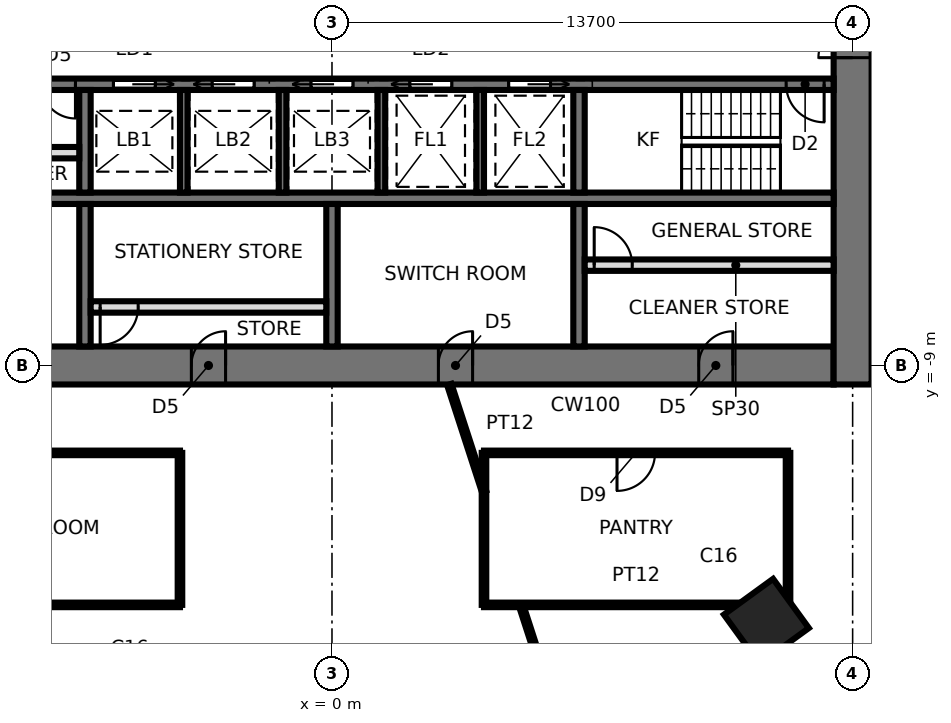
"""IFC4 building model, lengths in metres.
Left out: names, types, materials, properties, quantities, classifications, styles, units other than length and angle.
Written with IfcOpenShell. Run it as: python <this file> out.ifc"""

import sys

from ifc_helpers import new_model, si_unit, direction, frame, frame_2d, origin, origin_2d, place, context, subcontext, project, spatial, rectangle, extrude, element, fill, save


model = new_model("IFC4")
c1 = context("Model", 3, precision=1e-05, world=origin(), true_north=direction((0.0, 1.0)))
c2 = subcontext(c1, "Body", "Model", "MODEL_VIEW")
j1 = project(units=[si_unit("LENGTHUNIT", "METRE"), si_unit("PLANEANGLEUNIT", "RADIAN")], contexts=[c1])
p1 = place(None, origin())
s1 = spatial("IfcSite", under=j1, at=p1, CompositionType="ELEMENT")
p2 = place(p1, origin())
s2 = spatial("IfcBuilding", under=s1, at=p2, CompositionType="ELEMENT")
p3 = place(p2, frame((0.0, 0.0, 162.6)))
s3 = spatial("IfcBuildingStorey", under=s2, at=p3, CompositionType="ELEMENT", Elevation=162.6)
p4 = place(p3, frame((11.43, -15.733, 0.0), z_axis=(0.0, 0.0, 1.0), x_axis=(0.587785252292, -0.809016994375, 0.0)))
e1 = element("IfcColumn", 1, at=p4, inside=s3, PredefinedType="COLUMN", context=c2, shape_type="SweptSolid", body=[
    extrude(rectangle(XDim=1.6, YDim=1.6, at=origin_2d()), origin(), (0.0, 0.0, 1.0), 3.9),
])
p5 = place(p3, frame((-13.2, -9.0, 0.0), z_axis=(0.0, 0.0, 1.0), x_axis=(1.0, 0.0, 0.0)))
e2 = element("IfcWall", 2, at=p5, inside=s3, PredefinedType="SHEAR", context=c2, shape_type="SweptSolid", body=[
    extrude(rectangle(XDim=26.4, YDim=1.0, at=frame_2d((13.2, 0.0))), origin(), (0.0, 0.0, 1.0), 3.9),
])
p6 = place(p5, frame((2.65, 0.0, 0.0)))
e3 = element("IfcOpeningElement", 3, at=p6, cuts=e2, PredefinedType="OPENING", context=c2, shape_type="SweptSolid", body=[
    extrude(rectangle(XDim=0.9, YDim=2.1, at=frame_2d((0.45, 1.05))), frame((0.0, 0.51, 0.0), z_axis=(0.0, -1.0, 0.0), x_axis=(1.0, 0.0, 0.0)), (0.0, 0.0, 1.0), 1.02),
])
p7 = place(p5, frame((9.5, 0.0, 0.0)))
e4 = element("IfcOpeningElement", 4, at=p7, cuts=e2, PredefinedType="OPENING", context=c2, shape_type="SweptSolid", body=[
    extrude(rectangle(XDim=0.9, YDim=2.1, at=frame_2d((0.45, 1.05))), frame((0.0, 0.51, 0.0), z_axis=(0.0, -1.0, 0.0), x_axis=(1.0, 0.0, 0.0)), (0.0, 0.0, 1.0), 1.02),
])
p8 = place(p5, frame((16.0, 0.0, 0.0)))
e5 = element("IfcOpeningElement", 5, at=p8, cuts=e2, PredefinedType="OPENING", context=c2, shape_type="SweptSolid", body=[
    extrude(rectangle(XDim=0.9, YDim=2.1, at=frame_2d((0.45, 1.05))), frame((0.0, 0.51, 0.0), z_axis=(0.0, -1.0, 0.0), x_axis=(1.0, 0.0, 0.0)), (0.0, 0.0, 1.0), 1.02),
])
p9 = place(p5, frame((22.85, 0.0, 0.0)))
e6 = element("IfcOpeningElement", 6, at=p9, cuts=e2, PredefinedType="OPENING", context=c2, shape_type="SweptSolid", body=[
    extrude(rectangle(XDim=0.9, YDim=2.1, at=frame_2d((0.45, 1.05))), frame((0.0, 0.51, 0.0), z_axis=(0.0, -1.0, 0.0), x_axis=(1.0, 0.0, 0.0)), (0.0, 0.0, 1.0), 1.02),
])
p10 = place(p3, frame((13.7, -9.5, 0.0), z_axis=(0.0, 0.0, 1.0), x_axis=(0.0, 1.0, 0.0)))
e7 = element("IfcWall", 7, at=p10, inside=s3, PredefinedType="SHEAR", context=c2, shape_type="SweptSolid", body=[
    extrude(rectangle(XDim=19.0, YDim=1.0, at=frame_2d((9.5, 0.0))), origin(), (0.0, 0.0, 1.0), 3.9),
])
p11 = place(p10, frame((8.6, 0.0, 0.0)))
e8 = element("IfcOpeningElement", 8, at=p11, cuts=e7, PredefinedType="OPENING", context=c2, shape_type="SweptSolid", body=[
    extrude(rectangle(XDim=1.8, YDim=2.4, at=frame_2d((0.9, 1.2))), frame((0.0, 0.51, 0.0), z_axis=(0.0, -1.0, 0.0), x_axis=(1.0, 0.0, 0.0)), (0.0, 0.0, 1.0), 1.02),
])
p12 = place(p3, frame((-13.2, -1.6, 0.0), z_axis=(0.0, 0.0, 1.0), x_axis=(1.0, 0.0, 0.0)))
e9 = element("IfcWall", 9, at=p12, inside=s3, PredefinedType="SHEAR", context=c2, shape_type="SweptSolid", body=[
    extrude(rectangle(XDim=26.4, YDim=0.3, at=frame_2d((13.2, 0.0))), origin(), (0.0, 0.0, 1.0), 3.9),
])
p13 = place(p12, frame((25.15, 0.0, 0.0)))
e10 = element("IfcOpeningElement", 10, at=p13, cuts=e9, PredefinedType="OPENING", context=c2, shape_type="SweptSolid", body=[
    extrude(rectangle(XDim=1.0, YDim=2.1, at=frame_2d((0.5, 1.05))), frame((0.0, 0.16, 0.0), z_axis=(0.0, -1.0, 0.0), x_axis=(1.0, 0.0, 0.0)), (0.0, 0.0, 1.0), 0.32),
])
p14 = place(p12, frame((7.45, 0.0, 0.0)))
e11 = element("IfcOpeningElement", 11, at=p14, cuts=e9, PredefinedType="OPENING", context=c2, shape_type="SweptSolid", body=[
    extrude(rectangle(XDim=1.1, YDim=2.3, at=frame_2d((0.55, 1.15))), frame((0.0, 0.16, 0.0), z_axis=(0.0, -1.0, 0.0), x_axis=(1.0, 0.0, 0.0)), (0.0, 0.0, 1.0), 0.32),
])
p15 = place(p12, frame((10.05, 0.0, 0.0)))
e12 = element("IfcOpeningElement", 12, at=p15, cuts=e9, PredefinedType="OPENING", context=c2, shape_type="SweptSolid", body=[
    extrude(rectangle(XDim=1.1, YDim=2.3, at=frame_2d((0.55, 1.15))), frame((0.0, 0.16, 0.0), z_axis=(0.0, -1.0, 0.0), x_axis=(1.0, 0.0, 0.0)), (0.0, 0.0, 1.0), 0.32),
])
p16 = place(p12, frame((12.65, 0.0, 0.0)))
e13 = element("IfcOpeningElement", 13, at=p16, cuts=e9, PredefinedType="OPENING", context=c2, shape_type="SweptSolid", body=[
    extrude(rectangle(XDim=1.1, YDim=2.3, at=frame_2d((0.55, 1.15))), frame((0.0, 0.16, 0.0), z_axis=(0.0, -1.0, 0.0), x_axis=(1.0, 0.0, 0.0)), (0.0, 0.0, 1.0), 0.32),
])
p17 = place(p12, frame((15.25, 0.0, 0.0)))
e14 = element("IfcOpeningElement", 14, at=p17, cuts=e9, PredefinedType="OPENING", context=c2, shape_type="SweptSolid", body=[
    extrude(rectangle(XDim=1.1, YDim=2.3, at=frame_2d((0.55, 1.15))), frame((0.0, 0.16, 0.0), z_axis=(0.0, -1.0, 0.0), x_axis=(1.0, 0.0, 0.0)), (0.0, 0.0, 1.0), 0.32),
])
p18 = place(p12, frame((17.85, 0.0, 0.0)))
e15 = element("IfcOpeningElement", 15, at=p18, cuts=e9, PredefinedType="OPENING", context=c2, shape_type="SweptSolid", body=[
    extrude(rectangle(XDim=1.1, YDim=2.3, at=frame_2d((0.55, 1.15))), frame((0.0, 0.16, 0.0), z_axis=(0.0, -1.0, 0.0), x_axis=(1.0, 0.0, 0.0)), (0.0, 0.0, 1.0), 0.32),
])
p19 = place(p12, frame((5.55, 0.0, 0.0)))
e16 = element("IfcOpeningElement", 16, at=p19, cuts=e9, PredefinedType="OPENING", context=c2, shape_type="SweptSolid", body=[
    extrude(rectangle(XDim=0.9, YDim=2.1, at=frame_2d((0.45, 1.05))), frame((0.0, 0.16, 0.0), z_axis=(0.0, -1.0, 0.0), x_axis=(1.0, 0.0, 0.0)), (0.0, 0.0, 1.0), 0.32),
])
p20 = place(p3, frame((-13.2, -4.6, 0.0), z_axis=(0.0, 0.0, 1.0), x_axis=(1.0, 0.0, 0.0)))
e17 = element("IfcWall", 17, at=p20, inside=s3, PredefinedType="SHEAR", context=c2, shape_type="SweptSolid", body=[
    extrude(rectangle(XDim=26.4, YDim=0.3, at=frame_2d((13.2, 0.0))), origin(), (0.0, 0.0, 1.0), 3.9),
])
p21 = place(p3, frame((-6.5, -1.75, 0.0), z_axis=(0.0, 0.0, 1.0), x_axis=(0.0, -1.0, 0.0)))
e18 = element("IfcWall", 18, at=p21, inside=s3, PredefinedType="SHEAR", context=c2, shape_type="SweptSolid", body=[
    extrude(rectangle(XDim=2.7, YDim=0.3, at=frame_2d((1.35, 0.0))), origin(), (0.0, 0.0, 1.0), 3.9),
])
p22 = place(p3, frame((-6.5, -4.75, 0.0), z_axis=(0.0, 0.0, 1.0), x_axis=(0.0, -1.0, 0.0)))
e19 = element("IfcWall", 19, at=p22, inside=s3, PredefinedType="SHEAR", context=c2, shape_type="SweptSolid", body=[
    extrude(rectangle(XDim=3.75, YDim=0.3, at=frame_2d((1.875, 0.0))), origin(), (0.0, 0.0, 1.0), 3.9),
])
p23 = place(p3, frame((6.5, -1.75, 0.0), z_axis=(0.0, 0.0, 1.0), x_axis=(0.0, -1.0, 0.0)))
e20 = element("IfcWall", 20, at=p23, inside=s3, PredefinedType="SHEAR", context=c2, shape_type="SweptSolid", body=[
    extrude(rectangle(XDim=2.7, YDim=0.3, at=frame_2d((1.35, 0.0))), origin(), (0.0, 0.0, 1.0), 3.9),
])
p24 = place(p3, frame((6.5, -4.75, 0.0), z_axis=(0.0, 0.0, 1.0), x_axis=(0.0, -1.0, 0.0)))
e21 = element("IfcWall", 21, at=p24, inside=s3, PredefinedType="SHEAR", context=c2, shape_type="SweptSolid", body=[
    extrude(rectangle(XDim=3.75, YDim=0.3, at=frame_2d((1.875, 0.0))), origin(), (0.0, 0.0, 1.0), 3.9),
])
for number, where, z_axis, x_axis in (
    (22, (-3.9, -1.75, 0.0), (0.0, 0.0, 1.0), (0.0, -1.0, 0.0)),
    (23, (-1.3, -1.75, 0.0), (0.0, 0.0, 1.0), (0.0, -1.0, 0.0)),
    (24, (1.3, -1.75, 0.0), (0.0, 0.0, 1.0), (0.0, -1.0, 0.0)),
    (25, (3.9, -1.75, 0.0), (0.0, 0.0, 1.0), (0.0, -1.0, 0.0)),
):
    element("IfcWall", number, at=place(p3, frame(where, z_axis=z_axis, x_axis=x_axis)), inside=s3, PredefinedType="SHEAR", context=c2, shape_type="SweptSolid", body=[
        extrude(rectangle(XDim=2.7, YDim=0.2, at=frame_2d((1.35, 0.0))), origin(), (0.0, 0.0, 1.0), 3.9),
    ])
p25 = place(p3, frame((0.0, -4.75, 0.0), z_axis=(0.0, 0.0, 1.0), x_axis=(0.0, -1.0, 0.0)))
e26 = element("IfcWall", 26, at=p25, inside=s3, PredefinedType="SHEAR", context=c2, shape_type="SweptSolid", body=[
    extrude(rectangle(XDim=3.75, YDim=0.3, at=frame_2d((1.875, 0.0))), origin(), (0.0, 0.0, 1.0), 3.9),
])
p26 = place(p3, frame((-6.35, -7.46, 0.0), z_axis=(0.0, 0.0, 1.0), x_axis=(1.0, 0.0, 0.0)))
e27 = element("IfcWall", 27, at=p26, inside=s3, PredefinedType="PARTITIONING", context=c2, shape_type="SweptSolid", body=[
    extrude(rectangle(XDim=6.2, YDim=0.3, at=frame_2d((3.1, 0.0))), origin(), (0.0, 0.0, 1.0), 3.7),
])
p27 = place(p26, frame((0.25, 0.0, 0.0)))
e28 = element("IfcOpeningElement", 28, at=p27, cuts=e27, PredefinedType="OPENING", context=c2, shape_type="SweptSolid", body=[
    extrude(rectangle(XDim=1.0, YDim=2.4, at=frame_2d((0.5, 1.2))), frame((0.0, 0.16, 0.0), z_axis=(0.0, -1.0, 0.0), x_axis=(1.0, 0.0, 0.0)), (0.0, 0.0, 1.0), 0.32),
])
p28 = place(p3, frame((6.65, -6.36, 0.0), z_axis=(0.0, 0.0, 1.0), x_axis=(1.0, 0.0, 0.0)))
e29 = element("IfcWall", 29, at=p28, inside=s3, PredefinedType="PARTITIONING", context=c2, shape_type="SweptSolid", body=[
    extrude(rectangle(XDim=6.55, YDim=0.3, at=frame_2d((3.275, 0.0))), origin(), (0.0, 0.0, 1.0), 3.7),
])
p29 = place(p28, frame((0.25, 0.0, 0.0)))
e30 = element("IfcOpeningElement", 30, at=p29, cuts=e29, PredefinedType="OPENING", context=c2, shape_type="SweptSolid", body=[
    extrude(rectangle(XDim=1.0, YDim=2.4, at=frame_2d((0.5, 1.2))), frame((0.0, 0.16, 0.0), z_axis=(0.0, -1.0, 0.0), x_axis=(1.0, 0.0, 0.0)), (0.0, 0.0, 1.0), 0.32),
])
p30 = place(p3, frame((-13.2, -3.4, 0.0), z_axis=(0.0, 0.0, 1.0), x_axis=(1.0, 0.0, 0.0)))
e31 = element("IfcWall", 31, at=p30, inside=s3, PredefinedType="SOLIDWALL", context=c2, shape_type="SweptSolid", body=[
    extrude(rectangle(XDim=6.55, YDim=0.3, at=frame_2d((3.275, 0.0))), origin(), (0.0, 0.0, 1.0), 3.7),
])
p31 = place(p30, frame((0.25, 0.0, 0.0)))
e32 = element("IfcOpeningElement", 32, at=p31, cuts=e31, PredefinedType="OPENING", context=c2, shape_type="SweptSolid", body=[
    extrude(rectangle(XDim=0.9, YDim=2.1, at=frame_2d((0.45, 1.05))), frame((0.0, 0.16, 0.0), z_axis=(0.0, -1.0, 0.0), x_axis=(1.0, 0.0, 0.0)), (0.0, 0.0, 1.0), 0.32),
])
p32 = place(p3, frame((-12.0, -11.3, 0.0), z_axis=(0.0, 0.0, 1.0), x_axis=(1.0, 0.0, 0.0)))
e33 = element("IfcWall", 33, at=p32, inside=s3, PredefinedType="PARTITIONING", context=c2, shape_type="SweptSolid", body=[
    extrude(rectangle(XDim=8.0, YDim=0.12, at=frame_2d((4.0, 0.0))), origin(), (0.0, 0.0, 1.0), 3.7),
])
p33 = place(p32, frame((3.5, 0.0, 0.0)))
e34 = element("IfcOpeningElement", 34, at=p33, cuts=e33, PredefinedType="OPENING", context=c2, shape_type="SweptSolid", body=[
    extrude(rectangle(XDim=1.0, YDim=2.4, at=frame_2d((0.5, 1.2))), frame((0.0, 0.07, 0.0), z_axis=(0.0, -1.0, 0.0), x_axis=(1.0, 0.0, 0.0)), (0.0, 0.0, 1.0), 0.14),
])
p34 = place(p3, frame((-4.0, -15.3, 0.0), z_axis=(0.0, 0.0, 1.0), x_axis=(-1.0, 0.0, 0.0)))
e35 = element("IfcWall", 35, at=p34, inside=s3, PredefinedType="PARTITIONING", context=c2, shape_type="SweptSolid", body=[
    extrude(rectangle(XDim=8.0, YDim=0.12, at=frame_2d((4.0, 0.0))), origin(), (0.0, 0.0, 1.0), 3.24),
])
for number, where, z_axis, x_axis in (
    (36, (-4.0, -11.3, 0.0), (0.0, 0.0, 1.0), (0.0, -1.0, 0.0)),
    (37, (4.0, -11.3, 0.0), (0.0, 0.0, 1.0), (0.0, -1.0, 0.0)),
):
    element("IfcWall", number, at=place(p3, frame(where, z_axis=z_axis, x_axis=x_axis)), inside=s3, PredefinedType="PARTITIONING", context=c2, shape_type="SweptSolid", body=[
        extrude(rectangle(XDim=4.0, YDim=0.12, at=frame_2d((2.0, 0.0))), origin(), (0.0, 0.0, 1.0), 3.7),
    ])
p35 = place(p3, frame((3.087, -9.5, 0.0), z_axis=(0.0, 0.0, 1.0), x_axis=(0.309031903466, -0.951051671908, 0.0)))
e38 = element("IfcWall", 38, at=p35, inside=s3, PredefinedType="PARTITIONING", context=c2, shape_type="SweptSolid", body=[
    extrude(rectangle(XDim=2.956, YDim=0.12, at=frame_2d((1.478, 0.0))), origin(), (0.0, 0.0, 1.0), 2.7),
])
p36 = place(p3, frame((4.971, -15.3, 0.0), z_axis=(0.0, 0.0, 1.0), x_axis=(0.309041065628, -0.951048694734, 0.0)))
e39 = element("IfcWall", 39, at=p36, inside=s3, PredefinedType="PARTITIONING", context=c2, shape_type="SweptSolid", body=[
    extrude(rectangle(XDim=6.01, YDim=0.12, at=frame_2d((3.005, 0.0))), origin(), (0.0, 0.0, 1.0), 2.7),
])
p37 = place(p3, frame((4.0, -15.3, 0.0), z_axis=(0.0, 0.0, 1.0), x_axis=(1.0, 0.0, 0.0)))
e40 = element("IfcWall", 40, at=p37, inside=s3, PredefinedType="PARTITIONING", context=c2, shape_type="SweptSolid", body=[
    extrude(rectangle(XDim=8.0, YDim=0.12, at=frame_2d((4.0, 0.0))), origin(), (0.0, 0.0, 1.0), 3.24),
])
p38 = place(p3, frame((12.0, -11.3, 0.0), z_axis=(0.0, 0.0, 1.0), x_axis=(-1.0, 0.0, 0.0)))
e41 = element("IfcWall", 41, at=p38, inside=s3, PredefinedType="PARTITIONING", context=c2, shape_type="SweptSolid", body=[
    extrude(rectangle(XDim=8.0, YDim=0.12, at=frame_2d((4.0, 0.0))), origin(), (0.0, 0.0, 1.0), 3.7),
])
p39 = place(p38, frame((3.5, 0.0, 0.0)))
e42 = element("IfcOpeningElement", 42, at=p39, cuts=e41, PredefinedType="OPENING", context=c2, shape_type="SweptSolid", body=[
    extrude(rectangle(XDim=1.0, YDim=2.4, at=frame_2d((0.5, 1.2))), frame((0.0, 0.07, 0.0), z_axis=(0.0, -1.0, 0.0), x_axis=(1.0, 0.0, 0.0)), (0.0, 0.0, 1.0), 0.14),
])
p40 = place(p3, frame((12.0, -15.3, 0.0), z_axis=(0.0, 0.0, 1.0), x_axis=(0.0, 1.0, 0.0)))
e43 = element("IfcWall", 43, at=p40, inside=s3, PredefinedType="PARTITIONING", context=c2, shape_type="SweptSolid", body=[
    extrude(rectangle(XDim=4.0, YDim=0.12, at=frame_2d((2.0, 0.0))), origin(), (0.0, 0.0, 1.0), 3.7),
])
p41 = place(p11, origin())
e44 = element("IfcDoor", 44, at=p41, inside=s3, OperationType="DOUBLE_DOOR_SINGLE_SWING", PredefinedType="DOOR", context=c2, shape_type="SweptSolid", body=[
    extrude(rectangle(XDim=1.72, YDim=2.36, at=frame_2d((0.9, 1.18))), frame((0.0, 0.025, 0.0), z_axis=(0.0, -1.0, 0.0), x_axis=(1.0, 0.0, 0.0)), (0.0, 0.0, 1.0), 0.05),
    extrude(rectangle(XDim=0.04, YDim=2.4, at=frame_2d((0.02, 1.2))), frame((0.0, 0.25, 0.0), z_axis=(0.0, -1.0, 0.0), x_axis=(1.0, 0.0, 0.0)), (0.0, 0.0, 1.0), 0.5),
    extrude(rectangle(XDim=0.04, YDim=2.4, at=frame_2d((1.78, 1.2))), frame((0.0, 0.25, 0.0), z_axis=(0.0, -1.0, 0.0), x_axis=(1.0, 0.0, 0.0)), (0.0, 0.0, 1.0), 0.5),
    extrude(rectangle(XDim=1.72, YDim=0.04, at=frame_2d((0.9, 2.38))), frame((0.0, 0.25, 0.0), z_axis=(0.0, -1.0, 0.0), x_axis=(1.0, 0.0, 0.0)), (0.0, 0.0, 1.0), 0.5),
])
fill(e8, e44)
p42 = place(p13, frame((1.0, 0.0, 0.0), z_axis=(0.0, 0.0, 1.0), x_axis=(-1.0, 0.0, 0.0)))
e45 = element("IfcDoor", 45, at=p42, inside=s3, OperationType="SINGLE_SWING_LEFT", PredefinedType="DOOR", context=c2, shape_type="SweptSolid", body=[
    extrude(rectangle(XDim=1.0, YDim=2.1, at=frame_2d((0.5, 1.05))), frame((0.0, 0.025, 0.0), z_axis=(0.0, -1.0, 0.0), x_axis=(1.0, 0.0, 0.0)), (0.0, 0.0, 1.0), 0.05),
])
fill(e10, e45)
p43 = place(p14, frame((1.1, 0.0, 0.0), z_axis=(0.0, 0.0, 1.0), x_axis=(-1.0, 0.0, 0.0)))
e46 = element("IfcDoor", 46, at=p43, inside=s3, OperationType="SLIDING_TO_LEFT", PredefinedType="DOOR", context=c2, shape_type="SweptSolid", body=[
    extrude(rectangle(XDim=1.1, YDim=2.3, at=frame_2d((0.55, 1.15))), frame((0.0, 0.025, 0.0), z_axis=(0.0, -1.0, 0.0), x_axis=(1.0, 0.0, 0.0)), (0.0, 0.0, 1.0), 0.05),
])
fill(e11, e46)
p44 = place(p15, frame((1.1, 0.0, 0.0), z_axis=(0.0, 0.0, 1.0), x_axis=(-1.0, 0.0, 0.0)))
e47 = element("IfcDoor", 47, at=p44, inside=s3, OperationType="SLIDING_TO_RIGHT", PredefinedType="DOOR", context=c2, shape_type="SweptSolid", body=[
    extrude(rectangle(XDim=1.1, YDim=2.3, at=frame_2d((0.55, 1.15))), frame((0.0, 0.025, 0.0), z_axis=(0.0, -1.0, 0.0), x_axis=(1.0, 0.0, 0.0)), (0.0, 0.0, 1.0), 0.05),
])
fill(e12, e47)
p45 = place(p16, frame((1.1, 0.0, 0.0), z_axis=(0.0, 0.0, 1.0), x_axis=(-1.0, 0.0, 0.0)))
e48 = element("IfcDoor", 48, at=p45, inside=s3, OperationType="SLIDING_TO_RIGHT", PredefinedType="DOOR", context=c2, shape_type="SweptSolid", body=[
    extrude(rectangle(XDim=1.1, YDim=2.3, at=frame_2d((0.55, 1.15))), frame((0.0, 0.025, 0.0), z_axis=(0.0, -1.0, 0.0), x_axis=(1.0, 0.0, 0.0)), (0.0, 0.0, 1.0), 0.05),
])
fill(e13, e48)
p46 = place(p17, frame((1.1, 0.0, 0.0), z_axis=(0.0, 0.0, 1.0), x_axis=(-1.0, 0.0, 0.0)))
e49 = element("IfcDoor", 49, at=p46, inside=s3, OperationType="SLIDING_TO_RIGHT", PredefinedType="DOOR", context=c2, shape_type="SweptSolid", body=[
    extrude(rectangle(XDim=1.1, YDim=2.3, at=frame_2d((0.55, 1.15))), frame((0.0, 0.025, 0.0), z_axis=(0.0, -1.0, 0.0), x_axis=(1.0, 0.0, 0.0)), (0.0, 0.0, 1.0), 0.05),
])
fill(e14, e49)
p47 = place(p18, frame((1.1, 0.0, 0.0), z_axis=(0.0, 0.0, 1.0), x_axis=(-1.0, 0.0, 0.0)))
e50 = element("IfcDoor", 50, at=p47, inside=s3, OperationType="SLIDING_TO_LEFT", PredefinedType="DOOR", context=c2, shape_type="SweptSolid", body=[
    extrude(rectangle(XDim=1.1, YDim=2.3, at=frame_2d((0.55, 1.15))), frame((0.0, 0.025, 0.0), z_axis=(0.0, -1.0, 0.0), x_axis=(1.0, 0.0, 0.0)), (0.0, 0.0, 1.0), 0.05),
])
fill(e15, e50)
p48 = place(p19, frame((0.9, 0.0, 0.0), z_axis=(0.0, 0.0, 1.0), x_axis=(-1.0, 0.0, 0.0)))
e51 = element("IfcDoor", 51, at=p48, inside=s3, OperationType="SINGLE_SWING_LEFT", PredefinedType="DOOR", context=c2, shape_type="SweptSolid", body=[
    extrude(rectangle(XDim=0.9, YDim=2.1, at=frame_2d((0.45, 1.05))), frame((0.0, 0.025, 0.0), z_axis=(0.0, -1.0, 0.0), x_axis=(1.0, 0.0, 0.0)), (0.0, 0.0, 1.0), 0.05),
])
fill(e16, e51)
p49 = place(p7, origin())
e52 = element("IfcDoor", 52, at=p49, inside=s3, OperationType="SINGLE_SWING_RIGHT", PredefinedType="DOOR", context=c2, shape_type="SweptSolid", body=[
    extrude(rectangle(XDim=0.82, YDim=2.06, at=frame_2d((0.45, 1.03))), frame((0.0, 0.025, 0.0), z_axis=(0.0, -1.0, 0.0), x_axis=(1.0, 0.0, 0.0)), (0.0, 0.0, 1.0), 0.05),
    extrude(rectangle(XDim=0.04, YDim=2.1, at=frame_2d((0.02, 1.05))), frame((0.0, 0.25, 0.0), z_axis=(0.0, -1.0, 0.0), x_axis=(1.0, 0.0, 0.0)), (0.0, 0.0, 1.0), 0.5),
    extrude(rectangle(XDim=0.04, YDim=2.1, at=frame_2d((0.88, 1.05))), frame((0.0, 0.25, 0.0), z_axis=(0.0, -1.0, 0.0), x_axis=(1.0, 0.0, 0.0)), (0.0, 0.0, 1.0), 0.5),
    extrude(rectangle(XDim=0.82, YDim=0.04, at=frame_2d((0.45, 2.08))), frame((0.0, 0.25, 0.0), z_axis=(0.0, -1.0, 0.0), x_axis=(1.0, 0.0, 0.0)), (0.0, 0.0, 1.0), 0.5),
])
fill(e4, e52)
p50 = place(p8, origin())
e53 = element("IfcDoor", 53, at=p50, inside=s3, OperationType="SINGLE_SWING_RIGHT", PredefinedType="DOOR", context=c2, shape_type="SweptSolid", body=[
    extrude(rectangle(XDim=0.82, YDim=2.06, at=frame_2d((0.45, 1.03))), frame((0.0, 0.025, 0.0), z_axis=(0.0, -1.0, 0.0), x_axis=(1.0, 0.0, 0.0)), (0.0, 0.0, 1.0), 0.05),
    extrude(rectangle(XDim=0.04, YDim=2.1, at=frame_2d((0.02, 1.05))), frame((0.0, 0.25, 0.0), z_axis=(0.0, -1.0, 0.0), x_axis=(1.0, 0.0, 0.0)), (0.0, 0.0, 1.0), 0.5),
    extrude(rectangle(XDim=0.04, YDim=2.1, at=frame_2d((0.88, 1.05))), frame((0.0, 0.25, 0.0), z_axis=(0.0, -1.0, 0.0), x_axis=(1.0, 0.0, 0.0)), (0.0, 0.0, 1.0), 0.5),
    extrude(rectangle(XDim=0.82, YDim=0.04, at=frame_2d((0.45, 2.08))), frame((0.0, 0.25, 0.0), z_axis=(0.0, -1.0, 0.0), x_axis=(1.0, 0.0, 0.0)), (0.0, 0.0, 1.0), 0.5),
])
fill(e5, e53)
p51 = place(p9, origin())
e54 = element("IfcDoor", 54, at=p51, inside=s3, OperationType="SINGLE_SWING_RIGHT", PredefinedType="DOOR", context=c2, shape_type="SweptSolid", body=[
    extrude(rectangle(XDim=0.82, YDim=2.06, at=frame_2d((0.45, 1.03))), frame((0.0, 0.025, 0.0), z_axis=(0.0, -1.0, 0.0), x_axis=(1.0, 0.0, 0.0)), (0.0, 0.0, 1.0), 0.05),
    extrude(rectangle(XDim=0.04, YDim=2.1, at=frame_2d((0.02, 1.05))), frame((0.0, 0.25, 0.0), z_axis=(0.0, -1.0, 0.0), x_axis=(1.0, 0.0, 0.0)), (0.0, 0.0, 1.0), 0.5),
    extrude(rectangle(XDim=0.04, YDim=2.1, at=frame_2d((0.88, 1.05))), frame((0.0, 0.25, 0.0), z_axis=(0.0, -1.0, 0.0), x_axis=(1.0, 0.0, 0.0)), (0.0, 0.0, 1.0), 0.5),
    extrude(rectangle(XDim=0.82, YDim=0.04, at=frame_2d((0.45, 2.08))), frame((0.0, 0.25, 0.0), z_axis=(0.0, -1.0, 0.0), x_axis=(1.0, 0.0, 0.0)), (0.0, 0.0, 1.0), 0.5),
])
fill(e6, e54)
p52 = place(p27, frame((1.0, 0.0, 0.0), z_axis=(0.0, 0.0, 1.0), x_axis=(-1.0, 0.0, 0.0)))
e55 = element("IfcDoor", 55, at=p52, inside=s3, OperationType="SINGLE_SWING_RIGHT", PredefinedType="DOOR", context=c2, shape_type="SweptSolid", body=[
    extrude(rectangle(XDim=1.0, YDim=2.4, at=frame_2d((0.5, 1.2))), frame((0.0, 0.025, 0.0), z_axis=(0.0, -1.0, 0.0), x_axis=(1.0, 0.0, 0.0)), (0.0, 0.0, 1.0), 0.05),
])
fill(e28, e55)
p53 = place(p29, origin())
e56 = element("IfcDoor", 56, at=p53, inside=s3, OperationType="SINGLE_SWING_LEFT", PredefinedType="DOOR", context=c2, shape_type="SweptSolid", body=[
    extrude(rectangle(XDim=1.0, YDim=2.4, at=frame_2d((0.5, 1.2))), frame((0.0, 0.025, 0.0), z_axis=(0.0, -1.0, 0.0), x_axis=(1.0, 0.0, 0.0)), (0.0, 0.0, 1.0), 0.05),
])
fill(e30, e56)
p54 = place(p39, origin())
e57 = element("IfcDoor", 57, at=p54, inside=s3, OperationType="SINGLE_SWING_RIGHT", PredefinedType="DOOR", context=c2, shape_type="SweptSolid", body=[
    extrude(rectangle(XDim=1.0, YDim=2.4, at=frame_2d((0.5, 1.2))), frame((0.0, 0.025, 0.0), z_axis=(0.0, -1.0, 0.0), x_axis=(1.0, 0.0, 0.0)), (0.0, 0.0, 1.0), 0.05),
])
fill(e42, e57)
save(model, sys.argv[1])
